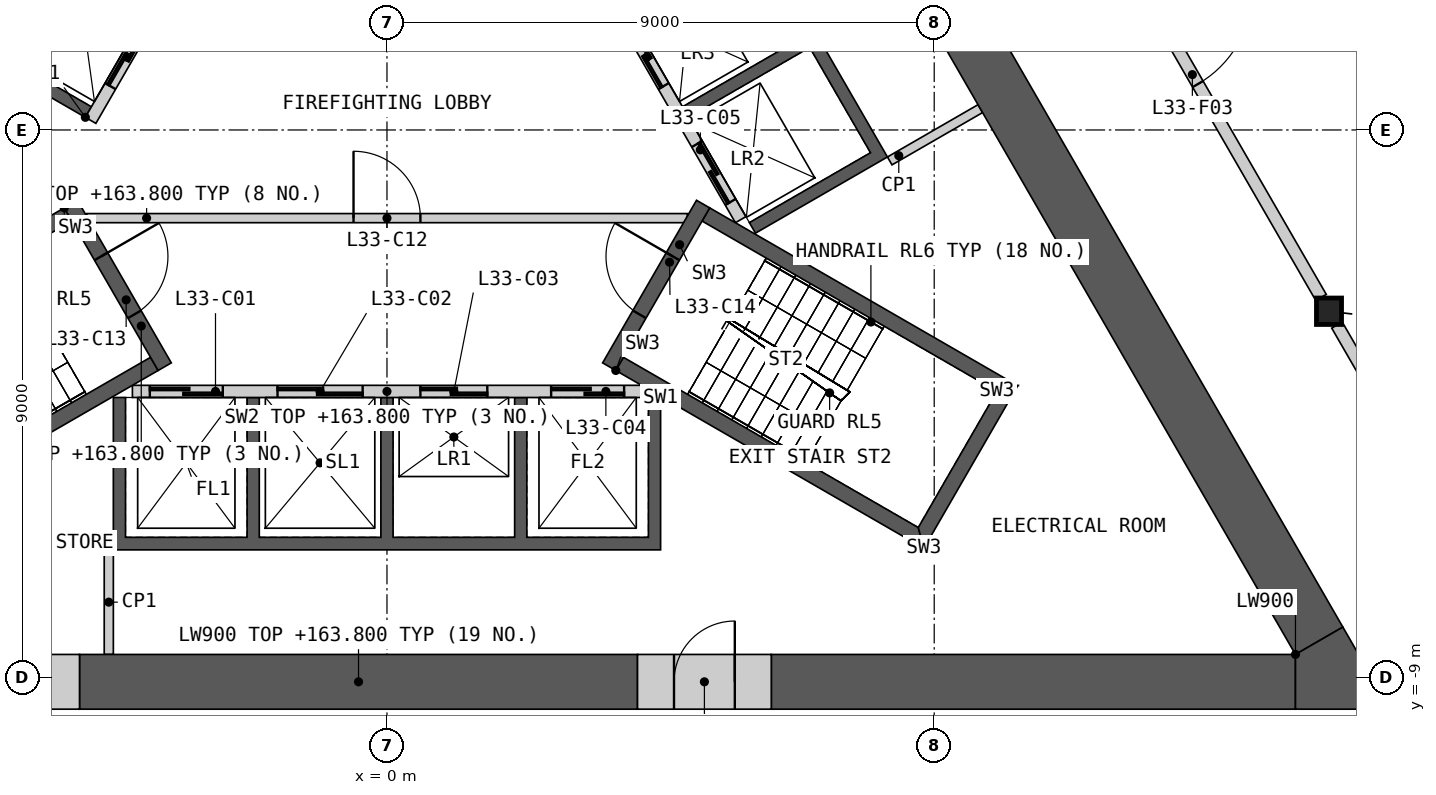
"""IFC4 building model, lengths in metres.
Left out: names, types, materials, properties, quantities, classifications, styles, units other than length and angle.
Written with IfcOpenShell. Run it as: python <this file> out.ifc"""

import sys

from ifc_helpers import new_model, si_unit, direction, frame, frame_2d, origin, origin_2d, place, context, subcontext, project, spatial, polyline, rectangle, i_section, outline, extrude, element, fill, save


model = new_model("IFC4")
c1 = context("Model", 3, precision=1e-05, world=origin(), true_north=direction((0.0, 1.0)))
c2 = subcontext(c1, "Body", "Model", "MODEL_VIEW")
j1 = project(units=[si_unit("LENGTHUNIT", "METRE"), si_unit("PLANEANGLEUNIT", "RADIAN")], contexts=[c1])
p1 = place(None, origin())
s1 = spatial("IfcSite", under=j1, at=p1, CompositionType="ELEMENT")
p2 = place(p1, origin())
s2 = spatial("IfcBuilding", under=s1, at=p2, CompositionType="ELEMENT")
p3 = place(p2, frame((0.0, 0.0, 154.2)))
s3 = spatial("IfcBuildingStorey", under=s2, at=p3, CompositionType="ELEMENT", Elevation=154.2)
p4 = place(p3, frame((15.493, -2.982, 0.0), z_axis=(0.0, 0.0, 1.0), x_axis=(1.0, 0.0, 0.0)))
e1 = element("IfcColumn", 1, at=p4, inside=s3, PredefinedType="COLUMN", context=c2, shape_type="SweptSolid", body=[
    extrude(i_section(OverallWidth=0.412, OverallDepth=0.435, WebThickness=0.036, FlangeThickness=0.057, at=origin_2d()), origin(), (0.0, 0.0, 1.0), 10.0),
])
p5 = place(p3, origin())
e2 = element("IfcWall", 2, at=p5, inside=s3, PredefinedType="SHEAR", context=c2, shape_type="SweptSolid", body=[
    extrude(outline(polyline([(4.5, -4.4), (4.5, -6.906), (-4.5, -6.906), (-4.5, -4.4), (-4.3, -4.4), (-4.3, -6.7), (-2.3, -6.7), (-2.3, -4.4), (-2.1, -4.4), (-2.1, -6.7), (-0.1, -6.7), (-0.1, -4.4), (0.1, -4.4), (0.1, -6.7), (2.1, -6.7), (2.1, -4.4), (2.3, -4.4), (2.3, -6.7), (4.3, -6.7), (4.3, -4.4), (4.5, -4.4)])), origin(), (0.0, 0.0, 1.0), 9.6),
])
p6 = place(p3, frame((-4.187, -4.3, 0.0), z_axis=(0.0, 0.0, 1.0), x_axis=(1.0, 0.0, 0.0)))
e3 = element("IfcWall", 3, at=p6, inside=s3, PredefinedType="SOLIDWALL", context=c2, shape_type="SweptSolid", body=[
    extrude(rectangle(XDim=8.373, YDim=0.2, at=frame_2d((4.187, 0.0))), origin(), (0.0, 0.0, 1.0), 9.6),
])
p7 = place(p6, frame((0.287, 0.0, 0.0)))
e4 = element("IfcOpeningElement", 4, at=p7, cuts=e3, PredefinedType="OPENING", context=c2, shape_type="SweptSolid", body=[
    extrude(rectangle(XDim=1.2, YDim=2.1, at=frame_2d((0.6, 1.05))), frame((0.0, 0.11, 0.0), z_axis=(0.0, -1.0, 0.0), x_axis=(1.0, 0.0, 0.0)), (0.0, 0.0, 1.0), 0.22),
])
p8 = place(p6, frame((2.387, 0.0, 0.0)))
e5 = element("IfcOpeningElement", 5, at=p8, cuts=e3, PredefinedType="OPENING", context=c2, shape_type="SweptSolid", body=[
    extrude(rectangle(XDim=1.4, YDim=2.1, at=frame_2d((0.7, 1.05))), frame((0.0, 0.11, 0.0), z_axis=(0.0, -1.0, 0.0), x_axis=(1.0, 0.0, 0.0)), (0.0, 0.0, 1.0), 0.22),
])
p9 = place(p6, frame((4.737, 0.0, 0.0)))
e6 = element("IfcOpeningElement", 6, at=p9, cuts=e3, PredefinedType="OPENING", context=c2, shape_type="SweptSolid", body=[
    extrude(rectangle(XDim=1.1, YDim=2.1, at=frame_2d((0.55, 1.05))), frame((0.0, 0.11, 0.0), z_axis=(0.0, -1.0, 0.0), x_axis=(1.0, 0.0, 0.0)), (0.0, 0.0, 1.0), 0.22),
])
p10 = place(p6, frame((6.887, 0.0, 0.0)))
e7 = element("IfcOpeningElement", 7, at=p10, cuts=e3, PredefinedType="OPENING", context=c2, shape_type="SweptSolid", body=[
    extrude(rectangle(XDim=1.2, YDim=2.1, at=frame_2d((0.6, 1.05))), frame((0.0, 0.11, 0.0), z_axis=(0.0, -1.0, 0.0), x_axis=(1.0, 0.0, 0.0)), (0.0, 0.0, 1.0), 0.22),
])
p11 = place(p3, origin())
e8 = element("IfcWall", 8, at=p11, inside=s3, PredefinedType="SHEAR", context=c2, shape_type="SweptSolid", body=[
    extrude(outline(polyline([(1.561, 6.097), (3.731, 7.35), (8.231, -0.444), (6.061, -1.697), (5.96, -1.524), (7.952, -0.374), (6.952, 1.358), (4.96, 0.208), (4.861, 0.381), (6.852, 1.531), (5.852, 3.263), (3.861, 2.113), (3.76, 2.287), (5.752, 3.437), (4.752, 5.169), (2.76, 4.019), (2.66, 4.192), (4.652, 5.342), (3.652, 7.074), (1.66, 5.924), (1.561, 6.097)])), origin(), (0.0, 0.0, 1.0), 9.6),
])
p12 = place(p3, frame((5.817, -1.476, 0.0), z_axis=(0.0, 0.0, 1.0), x_axis=(-0.500002616675, 0.866023893041, 0.0)))
e9 = element("IfcWall", 9, at=p12, inside=s3, PredefinedType="SOLIDWALL", context=c2, shape_type="SweptSolid", body=[
    extrude(rectangle(XDim=8.373, YDim=0.2, at=frame_2d((4.187, 0.0))), origin(), (0.0, 0.0, 1.0), 9.6),
])
p13 = place(p12, frame((0.337, 0.0, 0.0)))
e10 = element("IfcOpeningElement", 10, at=p13, cuts=e9, PredefinedType="OPENING", context=c2, shape_type="SweptSolid", body=[
    extrude(rectangle(XDim=1.1, YDim=2.1, at=frame_2d((0.55, 1.05))), frame((0.0, 0.11, 0.0), z_axis=(0.0, -1.0, 0.0), x_axis=(1.0, 0.0, 0.0)), (0.0, 0.0, 1.0), 0.22),
])
p14 = place(p12, frame((2.537, 0.0, 0.0)))
e11 = element("IfcOpeningElement", 11, at=p14, cuts=e9, PredefinedType="OPENING", context=c2, shape_type="SweptSolid", body=[
    extrude(rectangle(XDim=1.1, YDim=2.1, at=frame_2d((0.55, 1.05))), frame((0.0, 0.11, 0.0), z_axis=(0.0, -1.0, 0.0), x_axis=(1.0, 0.0, 0.0)), (0.0, 0.0, 1.0), 0.22),
])
p15 = place(p12, frame((4.737, 0.0, 0.0)))
e12 = element("IfcOpeningElement", 12, at=p15, cuts=e9, PredefinedType="OPENING", context=c2, shape_type="SweptSolid", body=[
    extrude(rectangle(XDim=1.1, YDim=2.1, at=frame_2d((0.55, 1.05))), frame((0.0, 0.11, 0.0), z_axis=(0.0, -1.0, 0.0), x_axis=(1.0, 0.0, 0.0)), (0.0, 0.0, 1.0), 0.22),
])
p16 = place(p12, frame((6.937, 0.0, 0.0)))
e13 = element("IfcOpeningElement", 13, at=p16, cuts=e9, PredefinedType="OPENING", context=c2, shape_type="SweptSolid", body=[
    extrude(rectangle(XDim=1.1, YDim=2.1, at=frame_2d((0.55, 1.05))), frame((0.0, 0.11, 0.0), z_axis=(0.0, -1.0, 0.0), x_axis=(1.0, 0.0, 0.0)), (0.0, 0.0, 1.0), 0.22),
])
p17 = place(p3, origin())
e14 = element("IfcWall", 14, at=p17, inside=s3, PredefinedType="SHEAR", context=c2, shape_type="SweptSolid", body=[
    extrude(outline(polyline([(-4.96, 0.208), (-7.131, 1.461), (-3.731, 7.35), (-1.561, 6.097), (-1.66, 5.924), (-3.652, 7.074), (-4.652, 5.342), (-2.66, 4.192), (-2.76, 4.019), (-4.752, 5.169), (-5.752, 3.437), (-3.76, 2.287), (-3.861, 2.113), (-5.852, 3.263), (-6.852, 1.531), (-4.861, 0.381), (-4.96, 0.208)])), origin(), (0.0, 0.0, 1.0), 9.6),
])
p18 = place(p3, frame((-1.631, 5.776, 0.0), z_axis=(0.0, 0.0, 1.0), x_axis=(-0.499992876559, -0.866029516466, 0.0)))
e15 = element("IfcWall", 15, at=p18, inside=s3, PredefinedType="SOLIDWALL", context=c2, shape_type="SweptSolid", body=[
    extrude(rectangle(XDim=6.486, YDim=0.2, at=frame_2d((3.243, 0.0))), origin(), (0.0, 0.0, 1.0), 9.6),
])
p19 = place(p18, frame((0.337, 0.0, 0.0)))
e16 = element("IfcOpeningElement", 16, at=p19, cuts=e15, PredefinedType="OPENING", context=c2, shape_type="SweptSolid", body=[
    extrude(rectangle(XDim=1.1, YDim=2.1, at=frame_2d((0.55, 1.05))), frame((0.0, 0.11, 0.0), z_axis=(0.0, -1.0, 0.0), x_axis=(1.0, 0.0, 0.0)), (0.0, 0.0, 1.0), 0.22),
])
p20 = place(p18, frame((2.537, 0.0, 0.0)))
e17 = element("IfcOpeningElement", 17, at=p20, cuts=e15, PredefinedType="OPENING", context=c2, shape_type="SweptSolid", body=[
    extrude(rectangle(XDim=1.1, YDim=2.1, at=frame_2d((0.55, 1.05))), frame((0.0, 0.11, 0.0), z_axis=(0.0, -1.0, 0.0), x_axis=(1.0, 0.0, 0.0)), (0.0, 0.0, 1.0), 0.22),
])
p21 = place(p18, frame((4.737, 0.0, 0.0)))
e18 = element("IfcOpeningElement", 18, at=p21, cuts=e15, PredefinedType="OPENING", context=c2, shape_type="SweptSolid", body=[
    extrude(rectangle(XDim=1.1, YDim=2.1, at=frame_2d((0.55, 1.05))), frame((0.0, 0.11, 0.0), z_axis=(0.0, -1.0, 0.0), x_axis=(1.0, 0.0, 0.0)), (0.0, 0.0, 1.0), 0.22),
])
p22 = place(p3, frame((-4.941, -1.45, 0.0), z_axis=(0.0, 0.0, 1.0), x_axis=(1.0, 0.0, 0.0)))
e19 = element("IfcWall", 19, at=p22, inside=s3, PredefinedType="PARTITIONING", context=c2, shape_type="SweptSolid", body=[
    extrude(rectangle(XDim=9.882, YDim=0.15, at=frame_2d((4.941, 0.0))), origin(), (0.0, 0.0, 1.0), 9.6),
])
p23 = place(p22, frame((4.391, 0.0, 0.0)))
e20 = element("IfcOpeningElement", 20, at=p23, cuts=e19, PredefinedType="OPENING", context=c2, shape_type="SweptSolid", body=[
    extrude(rectangle(XDim=1.1, YDim=2.1, at=frame_2d((0.55, 1.05))), frame((0.0, 0.085, 0.0), z_axis=(0.0, -1.0, 0.0), x_axis=(1.0, 0.0, 0.0)), (0.0, 0.0, 1.0), 0.17),
])
p24 = place(p3, origin())
e21 = element("IfcWall", 21, at=p24, inside=s3, PredefinedType="SHEAR", context=c2, shape_type="SweptSolid", body=[
    extrude(outline(polyline([(-5.307, -1.281), (-10.374, -4.206), (-10.032, -4.298), (-5.182, -1.498), (-5.307, -1.281)])), origin(), (0.0, 0.0, 1.0), 9.6),
])
p25 = place(p3, origin())
e22 = element("IfcWall", 22, at=p25, inside=s3, PredefinedType="SHEAR", context=c2, shape_type="SweptSolid", body=[
    extrude(outline(polyline([(-8.738, -6.539), (-8.83, -6.881), (-3.763, -3.956), (-3.888, -3.739), (-8.738, -6.539)])), origin(), (0.0, 0.0, 1.0), 9.6),
])
p26 = place(p3, frame((-5.199, -1.219, 0.0), z_axis=(0.0, 0.0, 1.0), x_axis=(0.499982516597, -0.866035497597, 0.0)))
e23 = element("IfcWall", 23, at=p26, inside=s3, PredefinedType="SHEAR", context=c2, shape_type="SweptSolid", body=[
    extrude(rectangle(XDim=3.088, YDim=0.25, at=frame_2d((1.544, 0.0))), origin(), (0.0, 0.0, 1.0), 9.6),
])
p27 = place(p26, frame((0.994, 0.0, 0.0)))
e24 = element("IfcOpeningElement", 24, at=p27, cuts=e23, PredefinedType="OPENING", context=c2, shape_type="SweptSolid", body=[
    extrude(rectangle(XDim=1.1, YDim=2.1, at=frame_2d((0.55, 1.05))), frame((0.0, 0.135, 0.0), z_axis=(0.0, -1.0, 0.0), x_axis=(1.0, 0.0, 0.0)), (0.0, 0.0, 1.0), 0.27),
])
p28 = place(p3, origin())
e25 = element("IfcWall", 25, at=p28, inside=s3, PredefinedType="SHEAR", context=c2, shape_type="SweptSolid", body=[
    extrude(outline(polyline([(3.763, -3.956), (8.83, -6.881), (8.738, -6.539), (3.888, -3.739), (3.763, -3.956)])), origin(), (0.0, 0.0, 1.0), 9.6),
])
p29 = place(p3, origin())
e26 = element("IfcWall", 26, at=p29, inside=s3, PredefinedType="SHEAR", context=c2, shape_type="SweptSolid", body=[
    extrude(outline(polyline([(8.83, -6.881), (10.374, -4.206), (10.032, -4.298), (8.738, -6.539), (8.83, -6.881)])), origin(), (0.0, 0.0, 1.0), 9.6),
])
p30 = place(p3, origin())
e27 = element("IfcWall", 27, at=p30, inside=s3, PredefinedType="SHEAR", context=c2, shape_type="SweptSolid", body=[
    extrude(outline(polyline([(10.032, -4.298), (10.374, -4.206), (5.307, -1.281), (5.182, -1.498), (10.032, -4.298)])), origin(), (0.0, 0.0, 1.0), 9.6),
])
p31 = place(p3, frame((3.655, -3.893, 0.0), z_axis=(0.0, 0.0, 1.0), x_axis=(0.499982516597, 0.866035497597, 0.0)))
e28 = element("IfcWall", 28, at=p31, inside=s3, PredefinedType="SHEAR", context=c2, shape_type="SweptSolid", body=[
    extrude(rectangle(XDim=3.088, YDim=0.25, at=frame_2d((1.544, 0.0))), origin(), (0.0, 0.0, 1.0), 9.6),
])
p32 = place(p31, frame((0.994, 0.0, 0.0)))
e29 = element("IfcOpeningElement", 29, at=p32, cuts=e28, PredefinedType="OPENING", context=c2, shape_type="SweptSolid", body=[
    extrude(rectangle(XDim=1.1, YDim=2.1, at=frame_2d((0.55, 1.05))), frame((0.0, 0.135, 0.0), z_axis=(0.0, -1.0, 0.0), x_axis=(1.0, 0.0, 0.0)), (0.0, 0.0, 1.0), 0.27),
])
for number, where, z_axis, x_axis in (
    (30, (8.268, -0.509, 0.0), (0.0, 0.0, 1.0), (0.866, 0.5, 0.0)),
    (31, (-4.575, -6.906, 0.0), (0.0, 0.0, 1.0), (0.0, -1.0, 0.0)),
):
    element("IfcWall", number, at=place(p3, frame(where, z_axis=z_axis, x_axis=x_axis)), inside=s3, PredefinedType="PARTITIONING", context=c2, shape_type="SweptSolid", body=[
        extrude(rectangle(XDim=1.72, YDim=0.15, at=frame_2d((0.86, 0.0))), origin(), (0.0, 0.0, 1.0), 9.6),
    ])
p33 = place(p3, frame((-5.056, -9.076, 0.0), z_axis=(0.0, 0.0, 1.0), x_axis=(1.0, 0.0, 0.0)))
e32 = element("IfcWall", 32, at=p33, inside=s3, PredefinedType="SHEAR", context=c2, shape_type="SweptSolid", body=[
    extrude(rectangle(XDim=9.177, YDim=0.9, at=frame_2d((4.588, 0.0))), origin(), (0.0, 0.0, 1.0), 9.6),
])
p34 = place(p3, frame((6.321, -9.076, 0.0), z_axis=(0.0, 0.0, 1.0), x_axis=(1.0, 0.0, 0.0)))
e33 = element("IfcWall", 33, at=p34, inside=s3, PredefinedType="SHEAR", context=c2, shape_type="SweptSolid", body=[
    extrude(rectangle(XDim=8.621, YDim=0.9, at=frame_2d((4.31, 0.0))), origin(), (0.0, 0.0, 1.0), 9.6),
])
p35 = place(p3, frame((15.331, -8.401, 0.0), z_axis=(0.0, 0.0, 1.0), x_axis=(-0.499990163897, 0.866031082587, 0.0)))
e34 = element("IfcWall", 34, at=p35, inside=s3, PredefinedType="SHEAR", context=c2, shape_type="SweptSolid", body=[
    extrude(rectangle(XDim=13.841, YDim=0.9, at=frame_2d((6.92, 0.0))), origin(), (0.0, 0.0, 1.0), 9.6),
])
p36 = place(p3, origin())
e35 = element("IfcWall", 35, at=p36, inside=s3, PredefinedType="SHEAR", context=c2, shape_type="SweptSolid", body=[
    extrude(outline(polyline([(14.941, -8.626), (15.721, -8.176), (16.5, -9.526), (14.941, -9.526), (14.941, -8.626)])), origin(), (0.0, 0.0, 1.0), 9.6),
])
p37 = place(p3, frame((-7.256, -9.076, 0.0), z_axis=(0.0, 0.0, 1.0), x_axis=(1.0, 0.0, 0.0)))
e36 = element("IfcWall", 36, at=p37, inside=s3, PredefinedType="SHEAR", context=c2, shape_type="SweptSolid", body=[
    extrude(rectangle(XDim=2.2, YDim=0.9, at=frame_2d((1.1, 0.0))), origin(), (0.0, 0.0, 1.0), 9.6),
])
p38 = place(p37, frame((0.6, 0.0, 0.0)))
e37 = element("IfcOpeningElement", 37, at=p38, cuts=e36, PredefinedType="OPENING", context=c2, shape_type="SweptSolid", body=[
    extrude(rectangle(XDim=1.0, YDim=2.1, at=frame_2d((0.5, 1.05))), frame((0.0, 0.46, 0.0), z_axis=(0.0, -1.0, 0.0), x_axis=(1.0, 0.0, 0.0)), (0.0, 0.0, 1.0), 0.92),
])
p39 = place(p3, frame((4.121, -9.076, 0.0), z_axis=(0.0, 0.0, 1.0), x_axis=(1.0, 0.0, 0.0)))
e38 = element("IfcWall", 38, at=p39, inside=s3, PredefinedType="SHEAR", context=c2, shape_type="SweptSolid", body=[
    extrude(rectangle(XDim=2.2, YDim=0.9, at=frame_2d((1.1, 0.0))), origin(), (0.0, 0.0, 1.0), 9.6),
])
p40 = place(p39, frame((0.6, 0.0, 0.0)))
e39 = element("IfcOpeningElement", 39, at=p40, cuts=e38, PredefinedType="OPENING", context=c2, shape_type="SweptSolid", body=[
    extrude(rectangle(XDim=1.0, YDim=2.1, at=frame_2d((0.5, 1.05))), frame((0.0, 0.46, 0.0), z_axis=(0.0, -1.0, 0.0), x_axis=(1.0, 0.0, 0.0)), (0.0, 0.0, 1.0), 0.92),
])
p41 = place(p3, frame((10.46, 5.736, 0.0), z_axis=(0.0, 0.0, 1.0), x_axis=(0.500004141693, -0.866023012564, 0.0)))
e40 = element("IfcWall", 40, at=p41, inside=s3, PredefinedType="PARTITIONING", context=c2, shape_type="SweptSolid", body=[
    extrude(rectangle(XDim=9.803, YDim=0.2, at=frame_2d((4.902, 0.0))), origin(), (0.0, 0.0, 1.0), 9.6),
])
p42 = place(p41, frame((3.952, 0.0, 0.0)))
e41 = element("IfcOpeningElement", 41, at=p42, cuts=e40, PredefinedType="OPENING", context=c2, shape_type="SweptSolid", body=[
    extrude(rectangle(XDim=1.8, YDim=2.1, at=frame_2d((0.9, 1.05))), frame((0.0, 0.11, 0.0), z_axis=(0.0, -1.0, 0.0), x_axis=(1.0, 0.0, 0.0)), (0.0, 0.0, 1.0), 0.22),
])
p43 = place(p3, frame((15.624, -3.209, 0.0), z_axis=(0.0, 0.0, 1.0), x_axis=(0.499997920671, -0.866026604282, 0.0)))
e42 = element("IfcWall", 42, at=p43, inside=s3, PredefinedType="PARTITIONING", context=c2, shape_type="SweptSolid", body=[
    extrude(rectangle(XDim=6.24, YDim=0.2, at=frame_2d((3.12, 0.0))), origin(), (0.0, 0.0, 1.0), 9.6),
])
p44 = place(p7, origin())
e43 = element("IfcDoor", 43, at=p44, inside=s3, OperationType="SLIDING_TO_LEFT", PredefinedType="DOOR", context=c2, shape_type="SweptSolid", body=[
    extrude(rectangle(XDim=1.2, YDim=2.1, at=frame_2d((0.6, 1.05))), frame((0.0, 0.025, 0.0), z_axis=(0.0, -1.0, 0.0), x_axis=(1.0, 0.0, 0.0)), (0.0, 0.0, 1.0), 0.05),
])
fill(e4, e43)
p45 = place(p8, origin())
e44 = element("IfcDoor", 44, at=p45, inside=s3, OperationType="SLIDING_TO_LEFT", PredefinedType="DOOR", context=c2, shape_type="SweptSolid", body=[
    extrude(rectangle(XDim=1.4, YDim=2.1, at=frame_2d((0.7, 1.05))), frame((0.0, 0.025, 0.0), z_axis=(0.0, -1.0, 0.0), x_axis=(1.0, 0.0, 0.0)), (0.0, 0.0, 1.0), 0.05),
])
fill(e5, e44)
p46 = place(p9, origin())
e45 = element("IfcDoor", 45, at=p46, inside=s3, OperationType="SLIDING_TO_LEFT", PredefinedType="DOOR", context=c2, shape_type="SweptSolid", body=[
    extrude(rectangle(XDim=1.1, YDim=2.1, at=frame_2d((0.55, 1.05))), frame((0.0, 0.025, 0.0), z_axis=(0.0, -1.0, 0.0), x_axis=(1.0, 0.0, 0.0)), (0.0, 0.0, 1.0), 0.05),
])
fill(e6, e45)
p47 = place(p10, origin())
e46 = element("IfcDoor", 46, at=p47, inside=s3, OperationType="SLIDING_TO_LEFT", PredefinedType="DOOR", context=c2, shape_type="SweptSolid", body=[
    extrude(rectangle(XDim=1.2, YDim=2.1, at=frame_2d((0.6, 1.05))), frame((0.0, 0.025, 0.0), z_axis=(0.0, -1.0, 0.0), x_axis=(1.0, 0.0, 0.0)), (0.0, 0.0, 1.0), 0.05),
])
fill(e7, e46)
p48 = place(p13, origin())
e47 = element("IfcDoor", 47, at=p48, inside=s3, OperationType="SLIDING_TO_LEFT", PredefinedType="DOOR", context=c2, shape_type="SweptSolid", body=[
    extrude(rectangle(XDim=1.1, YDim=2.1, at=frame_2d((0.55, 1.05))), frame((0.0, 0.025, 0.0), z_axis=(0.0, -1.0, 0.0), x_axis=(1.0, 0.0, 0.0)), (0.0, 0.0, 1.0), 0.05),
])
fill(e10, e47)
p49 = place(p14, origin())
e48 = element("IfcDoor", 48, at=p49, inside=s3, OperationType="SLIDING_TO_LEFT", PredefinedType="DOOR", context=c2, shape_type="SweptSolid", body=[
    extrude(rectangle(XDim=1.1, YDim=2.1, at=frame_2d((0.55, 1.05))), frame((0.0, 0.025, 0.0), z_axis=(0.0, -1.0, 0.0), x_axis=(1.0, 0.0, 0.0)), (0.0, 0.0, 1.0), 0.05),
])
fill(e11, e48)
p50 = place(p21, origin())
e49 = element("IfcDoor", 49, at=p50, inside=s3, OperationType="SLIDING_TO_LEFT", PredefinedType="DOOR", context=c2, shape_type="SweptSolid", body=[
    extrude(rectangle(XDim=1.1, YDim=2.1, at=frame_2d((0.55, 1.05))), frame((0.0, 0.025, 0.0), z_axis=(0.0, -1.0, 0.0), x_axis=(1.0, 0.0, 0.0)), (0.0, 0.0, 1.0), 0.05),
])
fill(e18, e49)
p51 = place(p23, origin())
e50 = element("IfcDoor", 50, at=p51, inside=s3, OperationType="SINGLE_SWING_LEFT", PredefinedType="DOOR", context=c2, shape_type="SweptSolid", body=[
    extrude(rectangle(XDim=1.1, YDim=2.1, at=frame_2d((0.55, 1.05))), frame((0.0, 0.025, 0.0), z_axis=(0.0, -1.0, 0.0), x_axis=(1.0, 0.0, 0.0)), (0.0, 0.0, 1.0), 0.05),
])
fill(e20, e50)
p52 = place(p27, origin())
e51 = element("IfcDoor", 51, at=p52, inside=s3, OperationType="SINGLE_SWING_LEFT", PredefinedType="DOOR", context=c2, shape_type="SweptSolid", body=[
    extrude(rectangle(XDim=1.1, YDim=2.1, at=frame_2d((0.55, 1.05))), frame((0.0, 0.025, 0.0), z_axis=(0.0, -1.0, 0.0), x_axis=(1.0, 0.0, 0.0)), (0.0, 0.0, 1.0), 0.05),
])
fill(e24, e51)
p53 = place(p32, origin())
e52 = element("IfcDoor", 52, at=p53, inside=s3, OperationType="SINGLE_SWING_RIGHT", PredefinedType="DOOR", context=c2, shape_type="SweptSolid", body=[
    extrude(rectangle(XDim=1.1, YDim=2.1, at=frame_2d((0.55, 1.05))), frame((0.0, 0.025, 0.0), z_axis=(0.0, -1.0, 0.0), x_axis=(1.0, 0.0, 0.0)), (0.0, 0.0, 1.0), 0.05),
])
fill(e29, e52)
p54 = place(p40, origin())
e53 = element("IfcDoor", 53, at=p54, inside=s3, OperationType="SINGLE_SWING_RIGHT", PredefinedType="DOOR", context=c2, shape_type="SweptSolid", body=[
    extrude(rectangle(XDim=1.0, YDim=2.1, at=frame_2d((0.5, 1.05))), frame((0.0, 0.205, 0.0), z_axis=(0.0, -1.0, 0.0), x_axis=(1.0, 0.0, 0.0)), (0.0, 0.0, 1.0), 0.05),
])
fill(e39, e53)
p55 = place(p42, origin())
e54 = element("IfcDoor", 54, at=p55, inside=s3, OperationType="DOUBLE_DOOR_SINGLE_SWING", PredefinedType="DOOR", context=c2, shape_type="SweptSolid", body=[
    extrude(rectangle(XDim=1.8, YDim=2.1, at=frame_2d((0.9, 1.05))), frame((0.0, 0.025, 0.0), z_axis=(0.0, -1.0, 0.0), x_axis=(1.0, 0.0, 0.0)), (0.0, 0.0, 1.0), 0.05),
])
fill(e41, e54)
save(model, sys.argv[1])
